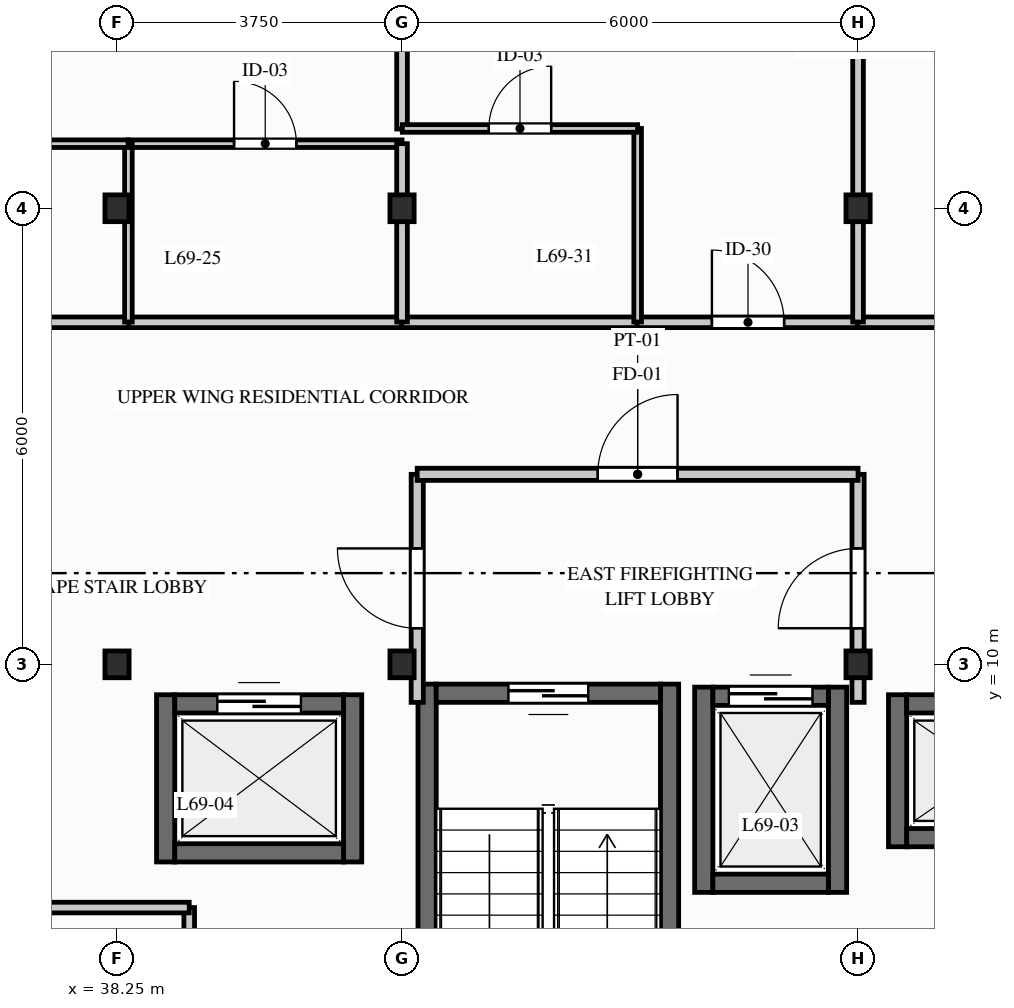
"""IFC4 building model, lengths in metres.
Left out: names, types, materials, properties, quantities, classifications, styles, units other than length and angle.
Written with IfcOpenShell. Run it as: python <this file> out.ifc"""

import sys

from ifc_helpers import new_model, si_unit, direction, frame, frame_2d, origin, origin_2d, place, context, subcontext, project, spatial, rectangle, i_section, extrude, element, fill, save


model = new_model("IFC4")
c1 = context("Model", 3, precision=1e-05, world=origin(), true_north=direction((0.0, 1.0)))
c2 = subcontext(c1, "Body", "Model", "MODEL_VIEW")
j1 = project(units=[si_unit("LENGTHUNIT", "METRE"), si_unit("PLANEANGLEUNIT", "RADIAN")], contexts=[c1])
p1 = place(None, origin())
s1 = spatial("IfcSite", under=j1, at=p1, CompositionType="ELEMENT")
p2 = place(p1, origin())
s2 = spatial("IfcBuilding", under=s1, at=p2, CompositionType="ELEMENT")
p3 = place(p2, frame((0.0, 0.0, 227.3)))
s3 = spatial("IfcBuildingStorey", under=s2, at=p3, CompositionType="ELEMENT", Elevation=227.3)
for number, where, z_axis, x_axis in (
    (1, (38.25, 10.0, 0.0), (0.0, 0.0, 1.0), (1.0, 0.0, 0.0)),
    (2, (38.25, 16.0, 0.0), (0.0, 0.0, 1.0), (1.0, 0.0, 0.0)),
    (3, (42.0, 10.0, 0.0), (0.0, 0.0, 1.0), (1.0, 0.0, 0.0)),
    (4, (42.0, 16.0, 0.0), (0.0, 0.0, 1.0), (1.0, 0.0, 0.0)),
    (5, (48.0, 10.0, 0.0), (0.0, 0.0, 1.0), (1.0, 0.0, 0.0)),
    (6, (48.0, 16.0, 0.0), (0.0, 0.0, 1.0), (1.0, 0.0, 0.0)),
):
    element("IfcColumn", number, at=place(p3, frame(where, z_axis=z_axis, x_axis=x_axis)), inside=s3, PredefinedType="COLUMN", context=c2, shape_type="SweptSolid", body=[
        extrude(i_section(OverallWidth=0.318, OverallDepth=0.353, WebThickness=0.023, FlangeThickness=0.038, FilletRadius=0.015, at=origin_2d()), origin(), (0.0, 0.0, 1.0), 3.1),
    ])
for number, where, z_axis, x_axis in (
    (7, (42.33, 2.54, 0.0), (0.0, 0.0, 1.0), (0.0, 1.0, 0.0)),
    (8, (45.52, 2.54, 0.0), (0.0, 0.0, 1.0), (0.0, 1.0, 0.0)),
):
    element("IfcWall", number, at=place(p3, frame(where, z_axis=z_axis, x_axis=x_axis)), inside=s3, PredefinedType="SHEAR", context=c2, shape_type="SweptSolid", body=[
        extrude(rectangle(XDim=7.2, YDim=0.24, at=frame_2d((3.6, 0.0))), origin(), (0.0, 0.0, 1.0), 2.89),
    ])
p4 = place(p3, frame((45.4, 9.62, 0.0), z_axis=(0.0, 0.0, 1.0), x_axis=(-1.0, 0.0, 0.0)))
e9 = element("IfcWall", 9, at=p4, inside=s3, PredefinedType="SHEAR", context=c2, shape_type="SweptSolid", body=[
    extrude(rectangle(XDim=2.95, YDim=0.24, at=frame_2d((1.475, 0.0))), origin(), (0.0, 0.0, 1.0), 2.89),
])
p5 = place(p4, frame((0.95, 0.0, 0.0)))
e10 = element("IfcOpeningElement", 10, at=p5, cuts=e9, PredefinedType="OPENING", context=c2, shape_type="SweptSolid", body=[
    extrude(rectangle(XDim=1.05, YDim=2.06, at=frame_2d((0.525, 1.03))), frame((0.0, 0.13, 0.0), z_axis=(0.0, -1.0, 0.0), x_axis=(1.0, 0.0, 0.0)), (0.0, 0.0, 1.0), 0.26),
])
for number, where, z_axis, x_axis in (
    (11, (45.97, 7.0, 0.0), (0.0, 0.0, 1.0), (0.0, 1.0, 0.0)),
    (12, (47.73, 7.0, 0.0), (0.0, 0.0, 1.0), (0.0, 1.0, 0.0)),
):
    element("IfcWall", number, at=place(p3, frame(where, z_axis=z_axis, x_axis=x_axis)), inside=s3, PredefinedType="SHEAR", context=c2, shape_type="SweptSolid", body=[
        extrude(rectangle(XDim=2.7, YDim=0.24, at=frame_2d((1.35, 0.0))), origin(), (0.0, 0.0, 1.0), 2.89),
    ])
p6 = place(p3, frame((46.09, 7.12, 0.0), z_axis=(0.0, 0.0, 1.0), x_axis=(1.0, 0.0, 0.0)))
e13 = element("IfcWall", 13, at=p6, inside=s3, PredefinedType="SHEAR", context=c2, shape_type="SweptSolid", body=[
    extrude(rectangle(XDim=1.52, YDim=0.24, at=frame_2d((0.76, 0.0))), origin(), (0.0, 0.0, 1.0), 2.89),
])
p7 = place(p3, frame((46.09, 9.58, 0.0), z_axis=(0.0, 0.0, 1.0), x_axis=(1.0, 0.0, 0.0)))
e14 = element("IfcWall", 14, at=p7, inside=s3, PredefinedType="SHEAR", context=c2, shape_type="SweptSolid", body=[
    extrude(rectangle(XDim=1.52, YDim=0.24, at=frame_2d((0.76, 0.0))), origin(), (0.0, 0.0, 1.0), 2.89),
])
p8 = place(p7, frame((0.21, 0.0, 0.0)))
e15 = element("IfcOpeningElement", 15, at=p8, cuts=e14, PredefinedType="OPENING", context=c2, shape_type="SweptSolid", body=[
    extrude(rectangle(XDim=1.1, YDim=2.06, at=frame_2d((0.55, 1.03))), frame((0.0, 0.13, 0.0), z_axis=(0.0, -1.0, 0.0), x_axis=(1.0, 0.0, 0.0)), (0.0, 0.0, 1.0), 0.26),
])
for number, where, z_axis, x_axis in (
    (16, (38.89, 7.4, 0.0), (0.0, 0.0, 1.0), (0.0, 1.0, 0.0)),
    (17, (41.35, 7.4, 0.0), (0.0, 0.0, 1.0), (0.0, 1.0, 0.0)),
):
    element("IfcWall", number, at=place(p3, frame(where, z_axis=z_axis, x_axis=x_axis)), inside=s3, PredefinedType="SHEAR", context=c2, shape_type="SweptSolid", body=[
        extrude(rectangle(XDim=2.2, YDim=0.24, at=frame_2d((1.1, 0.0))), origin(), (0.0, 0.0, 1.0), 2.89),
    ])
p9 = place(p3, frame((39.01, 7.52, 0.0), z_axis=(0.0, 0.0, 1.0), x_axis=(1.0, 0.0, 0.0)))
e18 = element("IfcWall", 18, at=p9, inside=s3, PredefinedType="SHEAR", context=c2, shape_type="SweptSolid", body=[
    extrude(rectangle(XDim=2.22, YDim=0.24, at=frame_2d((1.11, 0.0))), origin(), (0.0, 0.0, 1.0), 2.89),
])
p10 = place(p3, frame((39.01, 9.48, 0.0), z_axis=(0.0, 0.0, 1.0), x_axis=(1.0, 0.0, 0.0)))
e19 = element("IfcWall", 19, at=p10, inside=s3, PredefinedType="SHEAR", context=c2, shape_type="SweptSolid", body=[
    extrude(rectangle(XDim=2.22, YDim=0.24, at=frame_2d((1.11, 0.0))), origin(), (0.0, 0.0, 1.0), 2.89),
])
p11 = place(p10, frame((0.56, 0.0, 0.0)))
e20 = element("IfcOpeningElement", 20, at=p11, cuts=e19, PredefinedType="OPENING", context=c2, shape_type="SweptSolid", body=[
    extrude(rectangle(XDim=1.1, YDim=2.06, at=frame_2d((0.55, 1.03))), frame((0.0, 0.13, 0.0), z_axis=(0.0, -1.0, 0.0), x_axis=(1.0, 0.0, 0.0)), (0.0, 0.0, 1.0), 0.26),
])
p12 = place(p3, frame((48.52, 7.6, 0.0), z_axis=(0.0, 0.0, 1.0), x_axis=(0.0, 1.0, 0.0)))
e21 = element("IfcWall", 21, at=p12, inside=s3, PredefinedType="SHEAR", context=c2, shape_type="SweptSolid", body=[
    extrude(rectangle(XDim=2.0, YDim=0.24, at=frame_2d((1.0, 0.0))), origin(), (0.0, 0.0, 1.0), 2.89),
])
p13 = place(p3, frame((48.64, 7.72, 0.0), z_axis=(0.0, 0.0, 1.0), x_axis=(1.0, 0.0, 0.0)))
e22 = element("IfcWall", 22, at=p13, inside=s3, PredefinedType="SHEAR", context=c2, shape_type="SweptSolid", body=[
    extrude(rectangle(XDim=2.12, YDim=0.24, at=frame_2d((1.06, 0.0))), origin(), (0.0, 0.0, 1.0), 2.89),
])
p14 = place(p3, frame((48.64, 9.48, 0.0), z_axis=(0.0, 0.0, 1.0), x_axis=(1.0, 0.0, 0.0)))
e23 = element("IfcWall", 23, at=p14, inside=s3, PredefinedType="SHEAR", context=c2, shape_type="SweptSolid", body=[
    extrude(rectangle(XDim=2.12, YDim=0.24, at=frame_2d((1.06, 0.0))), origin(), (0.0, 0.0, 1.0), 2.89),
])
p15 = place(p14, frame((0.51, 0.0, 0.0)))
e24 = element("IfcOpeningElement", 24, at=p15, cuts=e23, PredefinedType="OPENING", context=c2, shape_type="SweptSolid", body=[
    extrude(rectangle(XDim=1.1, YDim=2.06, at=frame_2d((0.55, 1.03))), frame((0.0, 0.13, 0.0), z_axis=(0.0, -1.0, 0.0), x_axis=(1.0, 0.0, 0.0)), (0.0, 0.0, 1.0), 0.26),
])
p16 = place(p3, frame((42.2, 9.5, 0.0), z_axis=(0.0, 0.0, 1.0), x_axis=(0.0, 1.0, 0.0)))
e25 = element("IfcWall", 25, at=p16, inside=s3, PredefinedType="PARTITIONING", context=c2, shape_type="SweptSolid", body=[
    extrude(rectangle(XDim=3.0, YDim=0.16, at=frame_2d((1.5, 0.0))), origin(), (0.0, 0.0, 1.0), 2.325),
])
p17 = place(p16, frame((0.975, 0.0, 0.0)))
e26 = element("IfcOpeningElement", 26, at=p17, cuts=e25, PredefinedType="OPENING", context=c2, shape_type="SweptSolid", body=[
    extrude(rectangle(XDim=1.05, YDim=2.06, at=frame_2d((0.525, 1.03))), frame((0.0, 0.09, 0.0), z_axis=(0.0, -1.0, 0.0), x_axis=(1.0, 0.0, 0.0)), (0.0, 0.0, 1.0), 0.18),
])
p18 = place(p3, frame((48.0, 9.5, 0.0), z_axis=(0.0, 0.0, 1.0), x_axis=(0.0, 1.0, 0.0)))
e27 = element("IfcWall", 27, at=p18, inside=s3, PredefinedType="PARTITIONING", context=c2, shape_type="SweptSolid", body=[
    extrude(rectangle(XDim=3.0, YDim=0.16, at=frame_2d((1.5, 0.0))), origin(), (0.0, 0.0, 1.0), 2.325),
])
p19 = place(p18, frame((0.975, 0.0, 0.0)))
e28 = element("IfcOpeningElement", 28, at=p19, cuts=e27, PredefinedType="OPENING", context=c2, shape_type="SweptSolid", body=[
    extrude(rectangle(XDim=1.05, YDim=2.06, at=frame_2d((0.525, 1.03))), frame((0.0, 0.09, 0.0), z_axis=(0.0, -1.0, 0.0), x_axis=(1.0, 0.0, 0.0)), (0.0, 0.0, 1.0), 0.18),
])
p20 = place(p3, frame((42.2, 12.5, 0.0), z_axis=(0.0, 0.0, 1.0), x_axis=(1.0, 0.0, 0.0)))
e29 = element("IfcWall", 29, at=p20, inside=s3, PredefinedType="PARTITIONING", context=c2, shape_type="SweptSolid", body=[
    extrude(rectangle(XDim=5.8, YDim=0.16, at=frame_2d((2.9, 0.0))), origin(), (0.0, 0.0, 1.0), 2.325),
])
p21 = place(p20, frame((2.375, 0.0, 0.0)))
e30 = element("IfcOpeningElement", 30, at=p21, cuts=e29, PredefinedType="OPENING", context=c2, shape_type="SweptSolid", body=[
    extrude(rectangle(XDim=1.05, YDim=2.06, at=frame_2d((0.525, 1.03))), frame((0.0, 0.09, 0.0), z_axis=(0.0, -1.0, 0.0), x_axis=(1.0, 0.0, 0.0)), (0.0, 0.0, 1.0), 0.18),
])
p22 = place(p3, frame((38.389, 14.5, 0.0), z_axis=(0.0, 0.0, 1.0), x_axis=(1.0, 0.0, 0.0)))
e31 = element("IfcWall", 31, at=p22, inside=s3, PredefinedType="PARTITIONING", context=c2, shape_type="SweptSolid", body=[
    extrude(rectangle(XDim=3.623, YDim=0.14, at=frame_2d((1.811, 0.0))), origin(), (0.0, 0.0, 1.0), 2.325),
])
p23 = place(p3, frame((33.643, 14.5, 0.0), z_axis=(0.0, 0.0, 1.0), x_axis=(1.0, 0.0, 0.0)))
e32 = element("IfcWall", 32, at=p23, inside=s3, PredefinedType="PARTITIONING", context=c2, shape_type="SweptSolid", body=[
    extrude(rectangle(XDim=4.765, YDim=0.14, at=frame_2d((2.382, 0.0))), origin(), (0.0, 0.0, 1.0), 2.325),
])
p24 = place(p23, frame((1.907, 0.0, 0.0)))
e33 = element("IfcOpeningElement", 33, at=p24, cuts=e32, PredefinedType="OPENING", context=c2, shape_type="SweptSolid", body=[
    extrude(rectangle(XDim=0.95, YDim=2.05, at=frame_2d((0.475, 1.025))), frame((0.0, 0.08, 0.0), z_axis=(0.0, -1.0, 0.0), x_axis=(1.0, 0.0, 0.0)), (0.0, 0.0, 1.0), 0.16),
])
p25 = place(p3, frame((41.993, 14.5, 0.0), z_axis=(0.0, 0.0, 1.0), x_axis=(1.0, 0.0, 0.0)))
e34 = element("IfcWall", 34, at=p25, inside=s3, PredefinedType="PARTITIONING", context=c2, shape_type="SweptSolid", body=[
    extrude(rectangle(XDim=3.119, YDim=0.14, at=frame_2d((1.559, 0.0))), origin(), (0.0, 0.0, 1.0), 2.325),
])
p26 = place(p3, frame((45.093, 14.5, 0.0), z_axis=(0.0, 0.0, 1.0), x_axis=(1.0, 0.0, 0.0)))
e35 = element("IfcWall", 35, at=p26, inside=s3, PredefinedType="PARTITIONING", context=c2, shape_type="SweptSolid", body=[
    extrude(rectangle(XDim=2.918, YDim=0.14, at=frame_2d((1.459, 0.0))), origin(), (0.0, 0.0, 1.0), 2.325),
])
p27 = place(p26, frame((0.984, 0.0, 0.0)))
e36 = element("IfcOpeningElement", 36, at=p27, cuts=e35, PredefinedType="OPENING", context=c2, shape_type="SweptSolid", body=[
    extrude(rectangle(XDim=0.95, YDim=2.05, at=frame_2d((0.475, 1.025))), frame((0.0, 0.08, 0.0), z_axis=(0.0, -1.0, 0.0), x_axis=(1.0, 0.0, 0.0)), (0.0, 0.0, 1.0), 0.16),
])
p28 = place(p3, frame((47.993, 14.5, 0.0), z_axis=(0.0, 0.0, 1.0), x_axis=(1.0, 0.0, 0.0)))
e37 = element("IfcWall", 37, at=p28, inside=s3, PredefinedType="PARTITIONING", context=c2, shape_type="SweptSolid", body=[
    extrude(rectangle(XDim=5.615, YDim=0.14, at=frame_2d((2.807, 0.0))), origin(), (0.0, 0.0, 1.0), 2.325),
])
p29 = place(p28, frame((2.332, 0.0, 0.0)))
e38 = element("IfcOpeningElement", 38, at=p29, cuts=e37, PredefinedType="OPENING", context=c2, shape_type="SweptSolid", body=[
    extrude(rectangle(XDim=0.95, YDim=2.05, at=frame_2d((0.475, 1.025))), frame((0.0, 0.08, 0.0), z_axis=(0.0, -1.0, 0.0), x_axis=(1.0, 0.0, 0.0)), (0.0, 0.0, 1.0), 0.16),
])
p30 = place(p3, frame((38.4, 16.85, 0.0), z_axis=(0.0, 0.0, 1.0), x_axis=(1.0, 0.0, 0.0)))
e39 = element("IfcWall", 39, at=p30, inside=s3, PredefinedType="PARTITIONING", context=c2, shape_type="SweptSolid", body=[
    extrude(rectangle(XDim=3.6, YDim=0.1, at=frame_2d((1.8, 0.0))), origin(), (0.0, 0.0, 1.0), 2.325),
])
p31 = place(p30, frame((1.39, 0.0, 0.0)))
e40 = element("IfcOpeningElement", 40, at=p31, cuts=e39, PredefinedType="OPENING", context=c2, shape_type="SweptSolid", body=[
    extrude(rectangle(XDim=0.82, YDim=2.02, at=frame_2d((0.41, 1.01))), frame((0.0, 0.06, 0.0), z_axis=(0.0, -1.0, 0.0), x_axis=(1.0, 0.0, 0.0)), (0.0, 0.0, 1.0), 0.12),
])
p32 = place(p3, frame((38.4, 14.504, 0.0), z_axis=(0.0, 0.0, 1.0), x_axis=(0.0, 1.0, 0.0)))
e41 = element("IfcWall", 41, at=p32, inside=s3, PredefinedType="PARTITIONING", context=c2, shape_type="SweptSolid", body=[
    extrude(rectangle(XDim=2.346, YDim=0.1, at=frame_2d((1.173, 0.0))), origin(), (0.0, 0.0, 1.0), 2.325),
])
p33 = place(p3, frame((42.0, 14.504, 0.0), z_axis=(0.0, 0.0, 1.0), x_axis=(0.0, 1.0, 0.0)))
e42 = element("IfcWall", 42, at=p33, inside=s3, PredefinedType="PARTITIONING", context=c2, shape_type="SweptSolid", body=[
    extrude(rectangle(XDim=2.346, YDim=0.14, at=frame_2d((1.173, 0.0))), origin(), (0.0, 0.0, 1.0), 2.325),
])
p34 = place(p3, frame((36.418, 16.85, 0.0), z_axis=(0.0, 0.0, 1.0), x_axis=(1.0, 0.0, 0.0)))
e43 = element("IfcWall", 43, at=p34, inside=s3, PredefinedType="PARTITIONING", context=c2, shape_type="SweptSolid", body=[
    extrude(rectangle(XDim=1.978, YDim=0.1, at=frame_2d((0.989, 0.0))), origin(), (0.0, 0.0, 1.0), 2.325),
])
p35 = place(p3, frame((42.0, 17.043, 0.0), z_axis=(0.0, 0.0, 1.0), x_axis=(0.0, 1.0, 0.0)))
e44 = element("IfcWall", 44, at=p35, inside=s3, PredefinedType="PARTITIONING", context=c2, shape_type="SweptSolid", body=[
    extrude(rectangle(XDim=6.615, YDim=0.14, at=frame_2d((3.307, 0.0))), origin(), (0.0, 0.0, 1.0), 2.325),
])
p36 = place(p3, frame((45.1, 14.504, 0.0), z_axis=(0.0, 0.0, 1.0), x_axis=(0.0, 1.0, 0.0)))
e45 = element("IfcWall", 45, at=p36, inside=s3, PredefinedType="PARTITIONING", context=c2, shape_type="SweptSolid", body=[
    extrude(rectangle(XDim=2.546, YDim=0.1, at=frame_2d((1.273, 0.0))), origin(), (0.0, 0.0, 1.0), 2.325),
])
p37 = place(p3, frame((42.004, 17.05, 0.0), z_axis=(0.0, 0.0, 1.0), x_axis=(1.0, 0.0, 0.0)))
e46 = element("IfcWall", 46, at=p37, inside=s3, PredefinedType="PARTITIONING", context=c2, shape_type="SweptSolid", body=[
    extrude(rectangle(XDim=3.096, YDim=0.1, at=frame_2d((1.548, 0.0))), origin(), (0.0, 0.0, 1.0), 2.325),
])
p38 = place(p37, frame((1.138, 0.0, 0.0)))
e47 = element("IfcOpeningElement", 47, at=p38, cuts=e46, PredefinedType="OPENING", context=c2, shape_type="SweptSolid", body=[
    extrude(rectangle(XDim=0.82, YDim=2.02, at=frame_2d((0.41, 1.01))), frame((0.0, 0.06, 0.0), z_axis=(0.0, -1.0, 0.0), x_axis=(1.0, 0.0, 0.0)), (0.0, 0.0, 1.0), 0.12),
])
p39 = place(p3, frame((48.0, 14.504, 0.0), z_axis=(0.0, 0.0, 1.0), x_axis=(0.0, 1.0, 0.0)))
e48 = element("IfcWall", 48, at=p39, inside=s3, PredefinedType="PARTITIONING", context=c2, shape_type="SweptSolid", body=[
    extrude(rectangle(XDim=7.253, YDim=0.14, at=frame_2d((3.627, 0.0))), origin(), (0.0, 0.0, 1.0), 2.325),
])
p40 = place(p3, frame((39.2, 2.44, 0.0), z_axis=(0.0, 0.0, 1.0), x_axis=(0.0, 1.0, 0.0)))
e49 = element("IfcWall", 49, at=p40, inside=s3, PredefinedType="PARTITIONING", context=c2, shape_type="SweptSolid", body=[
    extrude(rectangle(XDim=4.36, YDim=0.14, at=frame_2d((2.18, 0.0))), origin(), (0.0, 0.0, 1.0), 2.89),
])
p41 = place(p3, frame((37.14, 6.8, 0.0), z_axis=(0.0, 0.0, 1.0), x_axis=(1.0, 0.0, 0.0)))
e50 = element("IfcWall", 50, at=p41, inside=s3, PredefinedType="PARTITIONING", context=c2, shape_type="SweptSolid", body=[
    extrude(rectangle(XDim=2.06, YDim=0.14, at=frame_2d((1.03, 0.0))), origin(), (0.0, 0.0, 1.0), 2.325),
])
p42 = place(p5, origin())
e51 = element("IfcDoor", 51, at=p42, inside=s3, OperationType="SINGLE_SWING_RIGHT", PredefinedType="DOOR", context=c2, shape_type="SweptSolid", body=[
    extrude(rectangle(XDim=1.05, YDim=2.06, at=frame_2d((0.525, 1.03))), frame((0.0, 0.025, 0.0), z_axis=(0.0, -1.0, 0.0), x_axis=(1.0, 0.0, 0.0)), (0.0, 0.0, 1.0), 0.05),
])
fill(e10, e51)
p43 = place(p8, origin())
e52 = element("IfcDoor", 52, at=p43, inside=s3, OperationType="SLIDING_TO_RIGHT", PredefinedType="DOOR", context=c2, shape_type="SweptSolid", body=[
    extrude(rectangle(XDim=1.1, YDim=2.06, at=frame_2d((0.55, 1.03))), frame((0.0, 0.025, 0.0), z_axis=(0.0, -1.0, 0.0), x_axis=(1.0, 0.0, 0.0)), (0.0, 0.0, 1.0), 0.05),
])
fill(e15, e52)
p44 = place(p11, origin())
e53 = element("IfcDoor", 53, at=p44, inside=s3, OperationType="SLIDING_TO_LEFT", PredefinedType="DOOR", context=c2, shape_type="SweptSolid", body=[
    extrude(rectangle(XDim=1.1, YDim=2.06, at=frame_2d((0.55, 1.03))), frame((0.0, 0.025, 0.0), z_axis=(0.0, -1.0, 0.0), x_axis=(1.0, 0.0, 0.0)), (0.0, 0.0, 1.0), 0.05),
])
fill(e20, e53)
p45 = place(p17, origin())
e54 = element("IfcDoor", 54, at=p45, inside=s3, OperationType="SINGLE_SWING_RIGHT", PredefinedType="DOOR", context=c2, shape_type="SweptSolid", body=[
    extrude(rectangle(XDim=1.05, YDim=2.06, at=frame_2d((0.525, 1.03))), frame((0.0, 0.025, 0.0), z_axis=(0.0, -1.0, 0.0), x_axis=(1.0, 0.0, 0.0)), (0.0, 0.0, 1.0), 0.05),
])
fill(e26, e54)
p46 = place(p19, origin())
e55 = element("IfcDoor", 55, at=p46, inside=s3, OperationType="SINGLE_SWING_LEFT", PredefinedType="DOOR", context=c2, shape_type="SweptSolid", body=[
    extrude(rectangle(XDim=1.05, YDim=2.06, at=frame_2d((0.525, 1.03))), frame((0.0, 0.025, 0.0), z_axis=(0.0, -1.0, 0.0), x_axis=(1.0, 0.0, 0.0)), (0.0, 0.0, 1.0), 0.05),
])
fill(e28, e55)
p47 = place(p21, origin())
e56 = element("IfcDoor", 56, at=p47, inside=s3, OperationType="SINGLE_SWING_RIGHT", PredefinedType="DOOR", context=c2, shape_type="SweptSolid", body=[
    extrude(rectangle(XDim=1.05, YDim=2.06, at=frame_2d((0.525, 1.03))), frame((0.0, 0.025, 0.0), z_axis=(0.0, -1.0, 0.0), x_axis=(1.0, 0.0, 0.0)), (0.0, 0.0, 1.0), 0.05),
])
fill(e30, e56)
p48 = place(p27, origin())
e57 = element("IfcDoor", 57, at=p48, inside=s3, OperationType="SINGLE_SWING_LEFT", PredefinedType="DOOR", context=c2, shape_type="SweptSolid", body=[
    extrude(rectangle(XDim=0.95, YDim=2.05, at=frame_2d((0.475, 1.025))), frame((0.0, 0.025, 0.0), z_axis=(0.0, -1.0, 0.0), x_axis=(1.0, 0.0, 0.0)), (0.0, 0.0, 1.0), 0.05),
])
fill(e36, e57)
p49 = place(p38, origin())
e58 = element("IfcDoor", 58, at=p49, inside=s3, OperationType="SINGLE_SWING_RIGHT", PredefinedType="DOOR", context=c2, shape_type="SweptSolid", body=[
    extrude(rectangle(XDim=0.82, YDim=2.02, at=frame_2d((0.41, 1.01))), frame((0.0, 0.025, 0.0), z_axis=(0.0, -1.0, 0.0), x_axis=(1.0, 0.0, 0.0)), (0.0, 0.0, 1.0), 0.05),
])
fill(e47, e58)
p50 = place(p31, origin())
e59 = element("IfcDoor", 59, at=p50, inside=s3, OperationType="SINGLE_SWING_LEFT", PredefinedType="DOOR", context=c2, shape_type="SweptSolid", body=[
    extrude(rectangle(XDim=0.82, YDim=2.02, at=frame_2d((0.41, 1.01))), frame((0.0, 0.025, 0.0), z_axis=(0.0, -1.0, 0.0), x_axis=(1.0, 0.0, 0.0)), (0.0, 0.0, 1.0), 0.05),
])
fill(e40, e59)
save(model, sys.argv[1])
